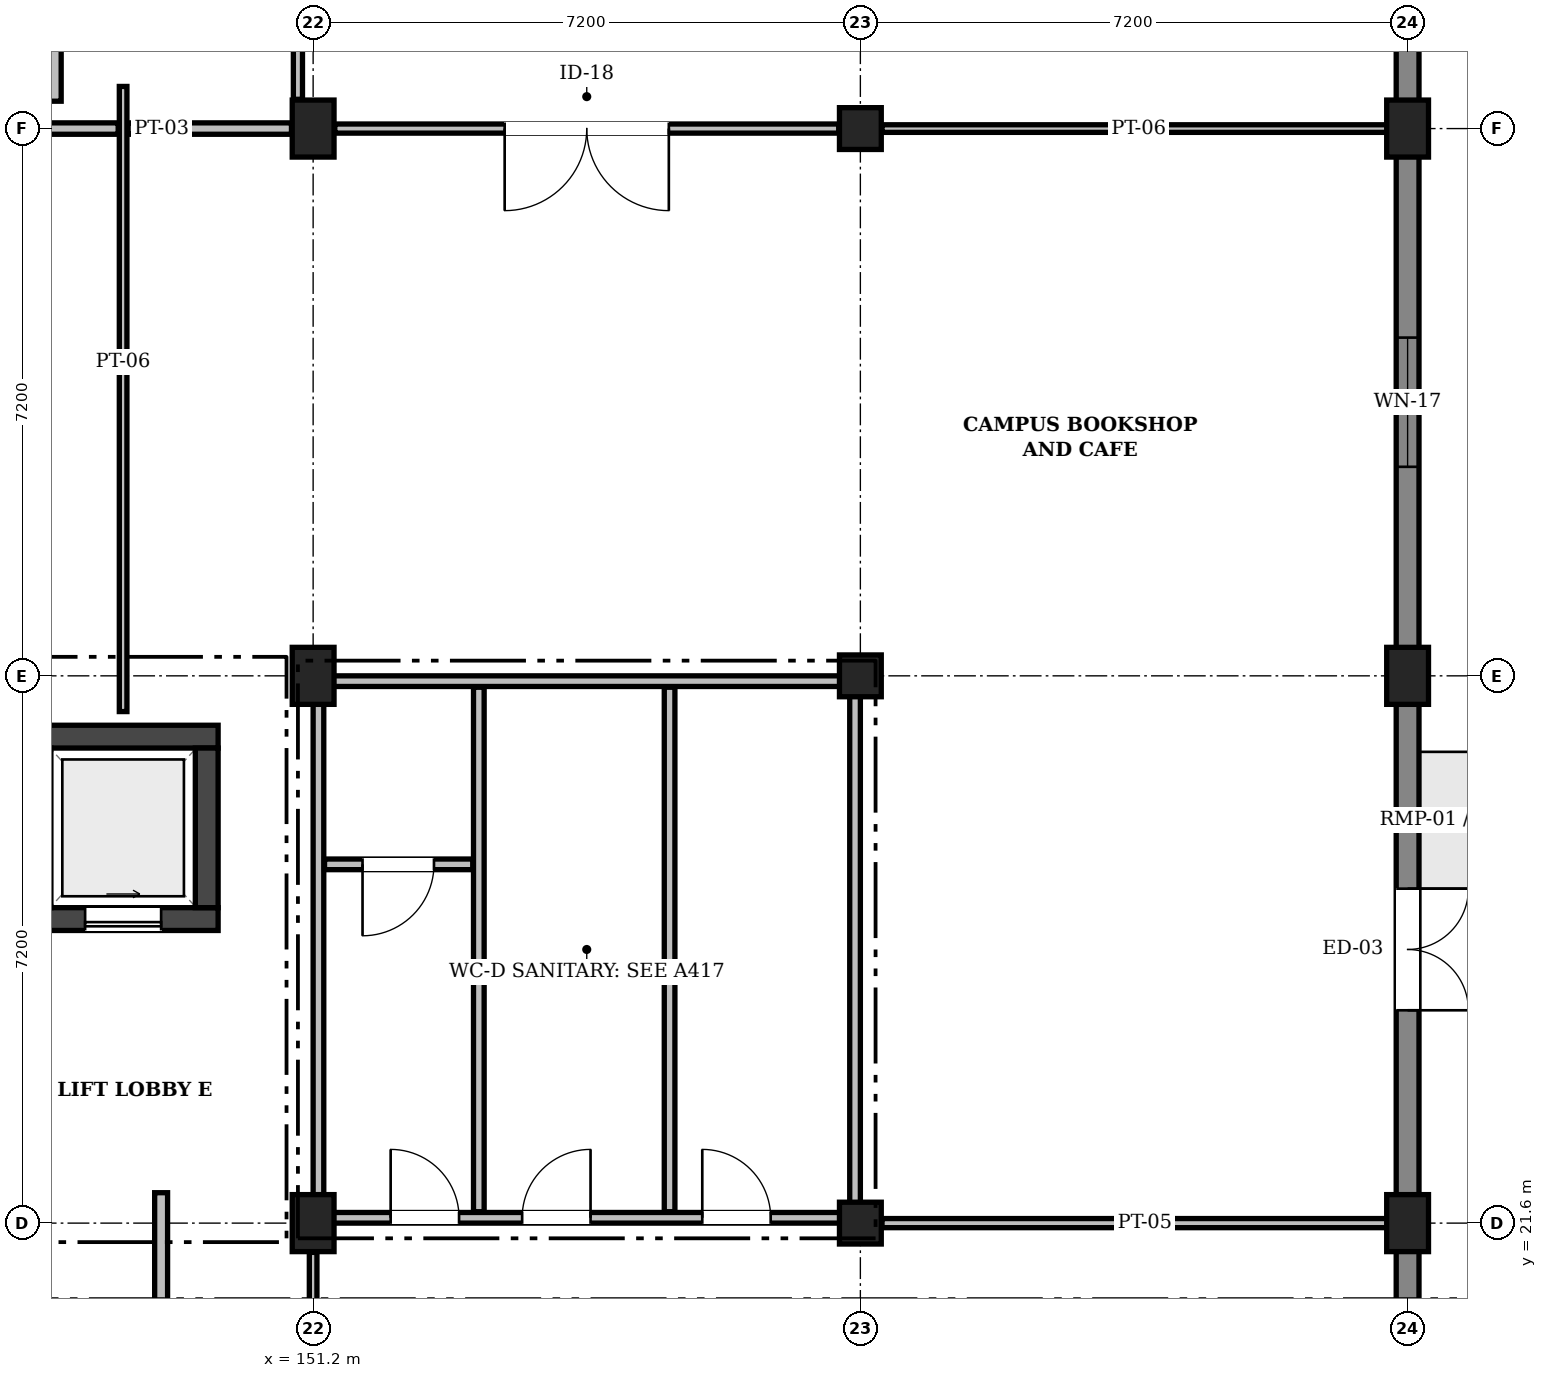
"""IFC4 building model, lengths in metres.
Left out: names, types, materials, properties, quantities, classifications, styles, units other than length and angle.
Written with IfcOpenShell. Run it as: python <this file> out.ifc"""

import sys

from ifc_helpers import new_model, si_unit, direction, frame, frame_2d, origin, origin_2d, place, context, subcontext, project, spatial, rectangle, extrude, element, fill, save


model = new_model("IFC4")
c1 = context("Model", 3, precision=1e-05, world=origin(), true_north=direction((0.0, 1.0)))
c2 = subcontext(c1, "Body", "Model", "MODEL_VIEW")
j1 = project(units=[si_unit("LENGTHUNIT", "METRE"), si_unit("PLANEANGLEUNIT", "RADIAN")], contexts=[c1])
p1 = place(None, origin())
s1 = spatial("IfcSite", under=j1, at=p1, CompositionType="ELEMENT")
p2 = place(p1, origin())
s2 = spatial("IfcBuilding", under=s1, at=p2, CompositionType="ELEMENT")
p3 = place(p2, origin())
s3 = spatial("IfcBuildingStorey", under=s2, at=p3, CompositionType="ELEMENT", Elevation=0.0)
for number, where, z_axis, x_axis in (
    (1, (151.2, 21.6, 0.0), (0.0, 0.0, 1.0), (1.0, 0.0, 0.0)),
    (2, (151.2, 28.8, 0.0), (0.0, 0.0, 1.0), (1.0, 0.0, 0.0)),
    (3, (151.2, 36.0, 0.0), (0.0, 0.0, 1.0), (1.0, 0.0, 0.0)),
):
    element("IfcColumn", number, at=place(p3, frame(where, z_axis=z_axis, x_axis=x_axis)), inside=s3, PredefinedType="COLUMN", context=c2, shape_type="SweptSolid", body=[
        extrude(rectangle(XDim=0.55, YDim=0.75, at=origin_2d()), origin(), (0.0, 0.0, 1.0), 4.8),
    ])
for number, where, z_axis, x_axis in (
    (4, (158.4, 21.6, 0.0), (0.0, 0.0, 1.0), (1.0, 0.0, 0.0)),
    (5, (158.4, 28.8, 0.0), (0.0, 0.0, 1.0), (1.0, 0.0, 0.0)),
    (6, (158.4, 36.0, 0.0), (0.0, 0.0, 1.0), (1.0, 0.0, 0.0)),
):
    element("IfcColumn", number, at=place(p3, frame(where, z_axis=z_axis, x_axis=x_axis)), inside=s3, PredefinedType="COLUMN", context=c2, shape_type="SweptSolid", body=[
        extrude(rectangle(XDim=0.55, YDim=0.55, at=origin_2d()), origin(), (0.0, 0.0, 1.0), 4.8),
    ])
for number, where, z_axis, x_axis in (
    (7, (165.6, 21.6, 0.0), (0.0, 0.0, 1.0), (1.0, 0.0, 0.0)),
    (8, (165.6, 28.8, 0.0), (0.0, 0.0, 1.0), (1.0, 0.0, 0.0)),
    (9, (165.6, 36.0, 0.0), (0.0, 0.0, 1.0), (1.0, 0.0, 0.0)),
):
    element("IfcColumn", number, at=place(p3, frame(where, z_axis=z_axis, x_axis=x_axis)), inside=s3, PredefinedType="COLUMN", context=c2, shape_type="SweptSolid", body=[
        extrude(rectangle(XDim=0.55, YDim=0.75, at=origin_2d()), origin(), (0.0, 0.0, 1.0), 4.8),
    ])
p4 = place(p3, frame((165.6, 43.2, 0.0), z_axis=(0.0, 0.0, 1.0), x_axis=(0.0, -1.0, 0.0)))
e10 = element("IfcWall", 10, at=p4, inside=s3, PredefinedType="SOLIDWALL", context=c2, shape_type="SweptSolid", body=[
    extrude(rectangle(XDim=7.2, YDim=0.3, at=frame_2d((3.6, 0.0))), origin(), (0.0, 0.0, 1.0), 4.52),
])
p5 = place(p4, frame((2.6, 0.0, 0.0)))
e11 = element("IfcOpeningElement", 11, at=p5, cuts=e10, PredefinedType="OPENING", context=c2, shape_type="SweptSolid", body=[
    extrude(rectangle(XDim=2.0, YDim=2.3, at=frame_2d((1.0, 1.15))), frame((0.0, 0.162, 0.0), z_axis=(0.0, -1.0, 0.0), x_axis=(1.0, 0.0, 0.0)), (0.0, 0.0, 1.0), 0.324),
])
p6 = place(p3, frame((165.6, 36.0, 0.0), z_axis=(0.0, 0.0, 1.0), x_axis=(0.0, -1.0, 0.0)))
e12 = element("IfcWall", 12, at=p6, inside=s3, PredefinedType="SOLIDWALL", context=c2, shape_type="SweptSolid", body=[
    extrude(rectangle(XDim=7.2, YDim=0.3, at=frame_2d((3.6, 0.0))), origin(), (0.0, 0.0, 1.0), 4.52),
])
p7 = place(p6, frame((2.75, 0.0, 0.95)))
e13 = element("IfcOpeningElement", 13, at=p7, cuts=e12, PredefinedType="OPENING", context=c2, shape_type="SweptSolid", body=[
    extrude(rectangle(XDim=1.7, YDim=1.55, at=frame_2d((0.85, 0.775))), frame((0.0, 0.162, 0.0), z_axis=(0.0, -1.0, 0.0), x_axis=(1.0, 0.0, 0.0)), (0.0, 0.0, 1.0), 0.324),
])
p8 = place(p3, frame((165.6, 28.8, 0.0), z_axis=(0.0, 0.0, 1.0), x_axis=(0.0, -1.0, 0.0)))
e14 = element("IfcWall", 14, at=p8, inside=s3, PredefinedType="SOLIDWALL", context=c2, shape_type="SweptSolid", body=[
    extrude(rectangle(XDim=7.2, YDim=0.3, at=frame_2d((3.6, 0.0))), origin(), (0.0, 0.0, 1.0), 4.52),
])
p9 = place(p8, frame((2.8, 0.0, 0.0)))
e15 = element("IfcOpeningElement", 15, at=p9, cuts=e14, PredefinedType="OPENING", context=c2, shape_type="SweptSolid", body=[
    extrude(rectangle(XDim=1.6, YDim=2.2, at=frame_2d((0.8, 1.1))), frame((0.0, 0.162, 0.0), z_axis=(0.0, -1.0, 0.0), x_axis=(1.0, 0.0, 0.0)), (0.0, 0.0, 1.0), 0.324),
])
p10 = place(p3, frame((165.6, 21.6, 0.0), z_axis=(0.0, 0.0, 1.0), x_axis=(0.0, -1.0, 0.0)))
e16 = element("IfcWall", 16, at=p10, inside=s3, PredefinedType="SOLIDWALL", context=c2, shape_type="SweptSolid", body=[
    extrude(rectangle(XDim=7.2, YDim=0.3, at=frame_2d((3.6, 0.0))), origin(), (0.0, 0.0, 1.0), 4.52),
])
p11 = place(p10, frame((2.675, 0.0, 0.95)))
e17 = element("IfcOpeningElement", 17, at=p11, cuts=e16, PredefinedType="OPENING", context=c2, shape_type="SweptSolid", body=[
    extrude(rectangle(XDim=1.85, YDim=1.55, at=frame_2d((0.925, 0.775))), frame((0.0, 0.162, 0.0), z_axis=(0.0, -1.0, 0.0), x_axis=(1.0, 0.0, 0.0)), (0.0, 0.0, 1.0), 0.324),
])
p12 = place(p3, frame((147.45, 25.6, 0.0), z_axis=(0.0, 0.0, 1.0), x_axis=(1.0, 0.0, 0.0)))
e18 = element("IfcWall", 18, at=p12, inside=s3, PredefinedType="SHEAR", context=c2, shape_type="SweptSolid", body=[
    extrude(rectangle(XDim=2.5, YDim=0.3, at=frame_2d((1.25, 0.0))), origin(), (0.0, 0.0, 1.0), 4.55),
])
p13 = place(p12, frame((0.75, 0.0, 0.0)))
e19 = element("IfcOpeningElement", 19, at=p13, cuts=e18, PredefinedType="OPENING", context=c2, shape_type="SweptSolid", body=[
    extrude(rectangle(XDim=1.0, YDim=2.1, at=frame_2d((0.5, 1.05))), frame((0.0, 0.162, 0.0), z_axis=(0.0, -1.0, 0.0), x_axis=(1.0, 0.0, 0.0)), (0.0, 0.0, 1.0), 0.324),
])
p14 = place(p3, frame((147.45, 28.0, 0.0), z_axis=(0.0, 0.0, 1.0), x_axis=(1.0, 0.0, 0.0)))
e20 = element("IfcWall", 20, at=p14, inside=s3, PredefinedType="SHEAR", context=c2, shape_type="SweptSolid", body=[
    extrude(rectangle(XDim=2.5, YDim=0.3, at=frame_2d((1.25, 0.0))), origin(), (0.0, 0.0, 1.0), 4.55),
])
p15 = place(p3, frame((149.8, 25.75, 0.0), z_axis=(0.0, 0.0, 1.0), x_axis=(0.0, 1.0, 0.0)))
e21 = element("IfcWall", 21, at=p15, inside=s3, PredefinedType="SHEAR", context=c2, shape_type="SweptSolid", body=[
    extrude(rectangle(XDim=2.1, YDim=0.3, at=frame_2d((1.05, 0.0))), origin(), (0.0, 0.0, 1.0), 4.55),
])
p16 = place(p3, frame((151.27, 21.67, 0.0), z_axis=(0.0, 0.0, 1.0), x_axis=(1.0, 0.0, 0.0)))
e22 = element("IfcWall", 22, at=p16, inside=s3, PredefinedType="PARTITIONING", context=c2, shape_type="SweptSolid", body=[
    extrude(rectangle(XDim=7.06, YDim=0.14, at=frame_2d((3.53, 0.0))), origin(), (0.0, 0.0, 1.0), 3.83),
])
p17 = place(p16, frame((0.95, 0.0, 0.0)))
e23 = element("IfcOpeningElement", 23, at=p17, cuts=e22, PredefinedType="OPENING", context=c2, shape_type="SweptSolid", body=[
    extrude(rectangle(XDim=0.9, YDim=2.08, at=frame_2d((0.45, 1.04))), frame((0.0, 0.082, 0.0), z_axis=(0.0, -1.0, 0.0), x_axis=(1.0, 0.0, 0.0)), (0.0, 0.0, 1.0), 0.164),
])
p18 = place(p16, frame((2.68, 0.0, 0.0)))
e24 = element("IfcOpeningElement", 24, at=p18, cuts=e22, PredefinedType="OPENING", context=c2, shape_type="SweptSolid", body=[
    extrude(rectangle(XDim=0.9, YDim=2.08, at=frame_2d((0.45, 1.04))), frame((0.0, 0.082, 0.0), z_axis=(0.0, -1.0, 0.0), x_axis=(1.0, 0.0, 0.0)), (0.0, 0.0, 1.0), 0.164),
])
p19 = place(p16, frame((5.05, 0.0, 0.0)))
e25 = element("IfcOpeningElement", 25, at=p19, cuts=e22, PredefinedType="OPENING", context=c2, shape_type="SweptSolid", body=[
    extrude(rectangle(XDim=0.9, YDim=2.08, at=frame_2d((0.45, 1.04))), frame((0.0, 0.082, 0.0), z_axis=(0.0, -1.0, 0.0), x_axis=(1.0, 0.0, 0.0)), (0.0, 0.0, 1.0), 0.164),
])
p20 = place(p3, frame((151.27, 28.73, 0.0), z_axis=(0.0, 0.0, 1.0), x_axis=(1.0, 0.0, 0.0)))
e26 = element("IfcWall", 26, at=p20, inside=s3, PredefinedType="PARTITIONING", context=c2, shape_type="SweptSolid", body=[
    extrude(rectangle(XDim=7.06, YDim=0.14, at=frame_2d((3.53, 0.0))), origin(), (0.0, 0.0, 1.0), 3.83),
])
for number, where, z_axis, x_axis in (
    (27, (151.27, 21.75, 0.0), (0.0, 0.0, 1.0), (0.0, 1.0, 0.0)),
    (28, (158.33, 21.75, 0.0), (0.0, 0.0, 1.0), (0.0, 1.0, 0.0)),
):
    element("IfcWall", number, at=place(p3, frame(where, z_axis=z_axis, x_axis=x_axis)), inside=s3, PredefinedType="PARTITIONING", context=c2, shape_type="SweptSolid", body=[
        extrude(rectangle(XDim=6.9, YDim=0.14, at=frame_2d((3.45, 0.0))), origin(), (0.0, 0.0, 1.0), 4.08),
    ])
for number, where, z_axis, x_axis in (
    (29, (153.38, 21.75, 0.0), (0.0, 0.0, 1.0), (0.0, 1.0, 0.0)),
    (30, (155.89, 21.75, 0.0), (0.0, 0.0, 1.0), (0.0, 1.0, 0.0)),
):
    element("IfcWall", number, at=place(p3, frame(where, z_axis=z_axis, x_axis=x_axis)), inside=s3, PredefinedType="PARTITIONING", context=c2, shape_type="SweptSolid", body=[
        extrude(rectangle(XDim=6.9, YDim=0.14, at=frame_2d((3.45, 0.0))), origin(), (0.0, 0.0, 1.0), 4.46),
    ])
p21 = place(p3, frame((151.35, 26.32, 0.0), z_axis=(0.0, 0.0, 1.0), x_axis=(1.0, 0.0, 0.0)))
e31 = element("IfcWall", 31, at=p21, inside=s3, PredefinedType="PARTITIONING", context=c2, shape_type="SweptSolid", body=[
    extrude(rectangle(XDim=1.95, YDim=0.14, at=frame_2d((0.975, 0.0))), origin(), (0.0, 0.0, 1.0), 4.46),
])
p22 = place(p21, frame((0.5, 0.0, 0.0)))
e32 = element("IfcOpeningElement", 32, at=p22, cuts=e31, PredefinedType="OPENING", context=c2, shape_type="SweptSolid", body=[
    extrude(rectangle(XDim=0.94, YDim=2.1, at=frame_2d((0.47, 1.05))), frame((0.0, 0.082, 0.0), z_axis=(0.0, -1.0, 0.0), x_axis=(1.0, 0.0, 0.0)), (0.0, 0.0, 1.0), 0.164),
])
p23 = place(p3, frame((147.8, 36.36, 0.0), z_axis=(0.0, 0.0, 1.0), x_axis=(0.0, 1.0, 0.0)))
e33 = element("IfcWall", 33, at=p23, inside=s3, PredefinedType="PARTITIONING", context=c2, shape_type="SweptSolid", body=[
    extrude(rectangle(XDim=9.811, YDim=0.17, at=frame_2d((4.906, 0.0))), origin(), (0.0, 0.0, 1.0), 4.46),
])
p24 = place(p23, frame((4.266, 0.0, 0.0)))
e34 = element("IfcOpeningElement", 34, at=p24, cuts=e33, PredefinedType="OPENING", context=c2, shape_type="SweptSolid", body=[
    extrude(rectangle(XDim=1.28, YDim=2.22, at=frame_2d((0.64, 1.11))), frame((0.0, 0.097, 0.0), z_axis=(0.0, -1.0, 0.0), x_axis=(1.0, 0.0, 0.0)), (0.0, 0.0, 1.0), 0.194),
])
p25 = place(p3, frame((149.2, 17.96, 0.0), z_axis=(0.0, 0.0, 1.0), x_axis=(0.0, 1.0, 0.0)))
e35 = element("IfcWall", 35, at=p25, inside=s3, PredefinedType="PARTITIONING", context=c2, shape_type="SweptSolid", body=[
    extrude(rectangle(XDim=4.04, YDim=0.17, at=frame_2d((2.02, 0.0))), origin(), (0.0, 0.0, 1.0), 4.46),
])
p26 = place(p3, frame((151.2, 14.785, 0.0), z_axis=(0.0, 0.0, 1.0), x_axis=(0.0, 1.0, 0.0)))
e36 = element("IfcWall", 36, at=p26, inside=s3, PredefinedType="PARTITIONING", context=c2, shape_type="SweptSolid", body=[
    extrude(rectangle(XDim=6.43, YDim=0.1, at=frame_2d((3.215, 0.0))), origin(), (0.0, 0.0, 1.0), 4.08),
])
p27 = place(p3, frame((158.685, 21.6, 0.0), z_axis=(0.0, 0.0, 1.0), x_axis=(1.0, 0.0, 0.0)))
e37 = element("IfcWall", 37, at=p27, inside=s3, PredefinedType="PARTITIONING", context=c2, shape_type="SweptSolid", body=[
    extrude(rectangle(XDim=6.753, YDim=0.12, at=frame_2d((3.376, 0.0))), origin(), (0.0, 0.0, 1.0), 3.83),
])
p28 = place(p3, frame((148.7, 28.33, 0.0), z_axis=(0.0, 0.0, 1.0), x_axis=(0.0, 1.0, 0.0)))
e38 = element("IfcWall", 38, at=p28, inside=s3, PredefinedType="PARTITIONING", context=c2, shape_type="SweptSolid", body=[
    extrude(rectangle(XDim=8.224, YDim=0.1, at=frame_2d((4.112, 0.0))), origin(), (0.0, 0.0, 1.0), 4.46),
])
p29 = place(p3, frame((148.765, 36.0, 0.0), z_axis=(0.0, 0.0, 1.0), x_axis=(1.0, 0.0, 0.0)))
e39 = element("IfcWall", 39, at=p29, inside=s3, PredefinedType="PARTITIONING", context=c2, shape_type="SweptSolid", body=[
    extrude(rectangle(XDim=2.15, YDim=0.15, at=frame_2d((1.075, 0.0))), origin(), (0.0, 0.0, 1.0), 3.83),
])
p30 = place(p3, frame((151.485, 36.0, 0.0), z_axis=(0.0, 0.0, 1.0), x_axis=(1.0, 0.0, 0.0)))
e40 = element("IfcWall", 40, at=p30, inside=s3, PredefinedType="PARTITIONING", context=c2, shape_type="SweptSolid", body=[
    extrude(rectangle(XDim=6.63, YDim=0.12, at=frame_2d((3.315, 0.0))), origin(), (0.0, 0.0, 1.0), 3.83),
])
p31 = place(p30, frame((2.235, 0.0, 0.0)))
e41 = element("IfcOpeningElement", 41, at=p31, cuts=e40, PredefinedType="OPENING", context=c2, shape_type="SweptSolid", body=[
    extrude(rectangle(XDim=2.16, YDim=2.35, at=frame_2d((1.08, 1.175))), frame((0.0, 0.072, 0.0), z_axis=(0.0, -1.0, 0.0), x_axis=(1.0, 0.0, 0.0)), (0.0, 0.0, 1.0), 0.144),
])
p32 = place(p3, frame((158.685, 36.0, 0.0), z_axis=(0.0, 0.0, 1.0), x_axis=(1.0, 0.0, 0.0)))
e42 = element("IfcWall", 42, at=p32, inside=s3, PredefinedType="PARTITIONING", context=c2, shape_type="SweptSolid", body=[
    extrude(rectangle(XDim=6.753, YDim=0.1, at=frame_2d((3.376, 0.0))), origin(), (0.0, 0.0, 1.0), 3.83),
])
p33 = place(p3, frame((144.162, 36.0, 0.0), z_axis=(0.0, 0.0, 1.0), x_axis=(1.0, 0.0, 0.0)))
e43 = element("IfcWall", 43, at=p33, inside=s3, PredefinedType="PARTITIONING", context=c2, shape_type="SweptSolid", body=[
    extrude(rectangle(XDim=4.473, YDim=0.15, at=frame_2d((2.236, 0.0))), origin(), (0.0, 0.0, 1.0), 3.83),
])
p34 = place(p33, frame((1.468, 0.0, 0.0)))
e44 = element("IfcOpeningElement", 44, at=p34, cuts=e43, PredefinedType="OPENING", context=c2, shape_type="SweptSolid", body=[
    extrude(rectangle(XDim=1.22, YDim=2.22, at=frame_2d((0.61, 1.11))), frame((0.0, 0.087, 0.0), z_axis=(0.0, -1.0, 0.0), x_axis=(1.0, 0.0, 0.0)), (0.0, 0.0, 1.0), 0.174),
])
p35 = place(p3, frame((151.0, 36.385, 0.0), z_axis=(0.0, 0.0, 1.0), x_axis=(0.0, 1.0, 0.0)))
e45 = element("IfcWall", 45, at=p35, inside=s3, PredefinedType="PARTITIONING", context=c2, shape_type="SweptSolid", body=[
    extrude(rectangle(XDim=6.33, YDim=0.12, at=frame_2d((3.165, 0.0))), origin(), (0.0, 0.0, 1.0), 4.08),
])
p36 = place(p35, frame((2.645, 0.0, 0.0)))
e46 = element("IfcOpeningElement", 46, at=p36, cuts=e45, PredefinedType="OPENING", context=c2, shape_type="SweptSolid", body=[
    extrude(rectangle(XDim=1.04, YDim=2.18, at=frame_2d((0.52, 1.09))), frame((0.0, 0.072, 0.0), z_axis=(0.0, -1.0, 0.0), x_axis=(1.0, 0.0, 0.0)), (0.0, 0.0, 1.0), 0.144),
])
p37 = place(p7, origin())
e47 = element("IfcWindow", 47, at=p37, inside=s3, PartitioningType="SINGLE_PANEL", PredefinedType="WINDOW", context=c2, shape_type="SweptSolid", body=[
    extrude(rectangle(XDim=1.7, YDim=1.55, at=frame_2d((0.85, 0.775))), frame((0.0, 0.03, 0.0), z_axis=(0.0, -1.0, 0.0), x_axis=(1.0, 0.0, 0.0)), (0.0, 0.0, 1.0), 0.06),
])
fill(e13, e47)
p38 = place(p9, origin())
e48 = element("IfcDoor", 48, at=p38, inside=s3, OperationType="DOUBLE_DOOR_SINGLE_SWING", PredefinedType="DOOR", context=c2, shape_type="SweptSolid", body=[
    extrude(rectangle(XDim=1.6, YDim=2.2, at=frame_2d((0.8, 1.1))), frame((0.0, 0.025, 0.0), z_axis=(0.0, -1.0, 0.0), x_axis=(1.0, 0.0, 0.0)), (0.0, 0.0, 1.0), 0.05),
])
fill(e15, e48)
p39 = place(p13, frame((1.0, 0.0, 0.0), z_axis=(0.0, 0.0, 1.0), x_axis=(-1.0, 0.0, 0.0)))
e49 = element("IfcDoor", 49, at=p39, inside=s3, OperationType="SLIDING_TO_RIGHT", PredefinedType="DOOR", context=c2, shape_type="SweptSolid", body=[
    extrude(rectangle(XDim=1.0, YDim=2.1, at=frame_2d((0.5, 1.05))), frame((0.0, 0.025, 0.0), z_axis=(0.0, -1.0, 0.0), x_axis=(1.0, 0.0, 0.0)), (0.0, 0.0, 1.0), 0.05),
])
fill(e19, e49)
p40 = place(p17, origin())
e50 = element("IfcDoor", 50, at=p40, inside=s3, OperationType="SINGLE_SWING_LEFT", PredefinedType="DOOR", context=c2, shape_type="SweptSolid", body=[
    extrude(rectangle(XDim=0.9, YDim=2.08, at=frame_2d((0.45, 1.04))), frame((0.0, 0.025, 0.0), z_axis=(0.0, -1.0, 0.0), x_axis=(1.0, 0.0, 0.0)), (0.0, 0.0, 1.0), 0.05),
])
fill(e23, e50)
p41 = place(p18, origin())
e51 = element("IfcDoor", 51, at=p41, inside=s3, OperationType="SINGLE_SWING_RIGHT", PredefinedType="DOOR", context=c2, shape_type="SweptSolid", body=[
    extrude(rectangle(XDim=0.9, YDim=2.08, at=frame_2d((0.45, 1.04))), frame((0.0, 0.025, 0.0), z_axis=(0.0, -1.0, 0.0), x_axis=(1.0, 0.0, 0.0)), (0.0, 0.0, 1.0), 0.05),
])
fill(e24, e51)
p42 = place(p19, origin())
e52 = element("IfcDoor", 52, at=p42, inside=s3, OperationType="SINGLE_SWING_LEFT", PredefinedType="DOOR", context=c2, shape_type="SweptSolid", body=[
    extrude(rectangle(XDim=0.9, YDim=2.08, at=frame_2d((0.45, 1.04))), frame((0.0, 0.025, 0.0), z_axis=(0.0, -1.0, 0.0), x_axis=(1.0, 0.0, 0.0)), (0.0, 0.0, 1.0), 0.05),
])
fill(e25, e52)
p43 = place(p22, frame((0.94, 0.0, 0.0), z_axis=(0.0, 0.0, 1.0), x_axis=(-1.0, 0.0, 0.0)))
e53 = element("IfcDoor", 53, at=p43, inside=s3, OperationType="SINGLE_SWING_RIGHT", PredefinedType="DOOR", context=c2, shape_type="SweptSolid", body=[
    extrude(rectangle(XDim=0.94, YDim=2.1, at=frame_2d((0.47, 1.05))), frame((0.0, 0.025, 0.0), z_axis=(0.0, -1.0, 0.0), x_axis=(1.0, 0.0, 0.0)), (0.0, 0.0, 1.0), 0.05),
])
fill(e32, e53)
p44 = place(p31, frame((2.16, 0.0, 0.0), z_axis=(0.0, 0.0, 1.0), x_axis=(-1.0, 0.0, 0.0)))
e54 = element("IfcDoor", 54, at=p44, inside=s3, OperationType="DOUBLE_DOOR_SINGLE_SWING", PredefinedType="DOOR", context=c2, shape_type="SweptSolid", body=[
    extrude(rectangle(XDim=2.16, YDim=2.35, at=frame_2d((1.08, 1.175))), frame((0.0, 0.025, 0.0), z_axis=(0.0, -1.0, 0.0), x_axis=(1.0, 0.0, 0.0)), (0.0, 0.0, 1.0), 0.05),
])
fill(e41, e54)
save(model, sys.argv[1])
